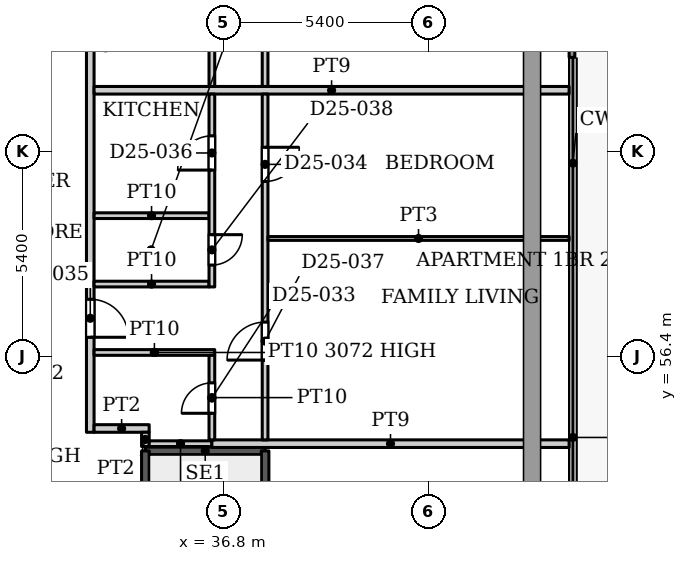
"""IFC4 building model, lengths in metres.
Left out: names, types, materials, properties, quantities, classifications, styles, units other than length and angle.
Written with IfcOpenShell. Run it as: python <this file> out.ifc"""

import sys

from ifc_helpers import new_model, si_unit, direction, frame, frame_2d, origin, place, context, subcontext, project, spatial, rectangle, extrude, source, transform, mapped, element, fill, save


model = new_model("IFC4")
c1 = context("Model", 3, precision=1e-05, world=origin(), true_north=direction((0.0, 1.0)))
c2 = subcontext(c1, "Body", "Model", "MODEL_VIEW")
j1 = project(units=[si_unit("LENGTHUNIT", "METRE"), si_unit("PLANEANGLEUNIT", "RADIAN")], contexts=[c1])
p1 = place(None, origin())
s1 = spatial("IfcSite", under=j1, at=p1, CompositionType="ELEMENT")
p2 = place(p1, origin())
s2 = spatial("IfcBuilding", under=s1, at=p2, CompositionType="ELEMENT")
p3 = place(p2, frame((0.0, 0.0, 109.7)))
s3 = spatial("IfcBuildingStorey", under=s2, at=p3, CompositionType="ELEMENT", Elevation=109.7)
p4 = place(p3, frame((45.975, 66.665, 0.0), z_axis=(0.0, 0.0, 1.0), x_axis=(0.0, -1.0, 0.0)))
e1 = element("IfcWall", 1, at=p4, inside=s3, PredefinedType="SOLIDWALL", context=c2, shape_type="SweptSolid", body=[
    extrude(rectangle(XDim=2.4, YDim=0.15, at=frame_2d((1.2, 0.0))), origin(), (0.0, 0.0, 1.0), 3.75),
])
p5 = place(p4, frame((0.3, 0.0, 0.0)))
e2 = element("IfcOpeningElement", 2, at=p5, cuts=e1, PredefinedType="OPENING", context=c2, shape_type="SweptSolid", body=[
    extrude(rectangle(XDim=1.8, YDim=2.4, at=frame_2d((0.9, 1.2))), frame((0.0, 0.085, 0.0), z_axis=(0.0, -1.0, 0.0), x_axis=(1.0, 0.0, 0.0)), (0.0, 0.0, 1.0), 0.17),
])
p6 = place(p3, frame((34.75, 53.91, 0.0), z_axis=(0.0, 0.0, 1.0), x_axis=(1.0, 0.0, 0.0)))
e3 = element("IfcWall", 3, at=p6, inside=s3, PredefinedType="SHEAR", context=c2, shape_type="SweptSolid", body=[
    extrude(rectangle(XDim=3.15, YDim=0.2, at=frame_2d((1.575, 0.0))), origin(), (0.0, 0.0, 1.0), 3.9),
])
p7 = place(p3, frame((34.75, 47.5, 0.0), z_axis=(0.0, 0.0, 1.0), x_axis=(0.0, 1.0, 0.0)))
e4 = element("IfcWall", 4, at=p7, inside=s3, PredefinedType="SHEAR", context=c2, shape_type="SweptSolid", body=[
    extrude(rectangle(XDim=6.41, YDim=0.2, at=frame_2d((3.205, 0.0))), origin(), (0.0, 0.0, 1.0), 3.9),
])
p8 = place(p3, frame((37.9, 44.75, 0.0), z_axis=(0.0, 0.0, 1.0), x_axis=(0.0, 1.0, 0.0)))
e5 = element("IfcWall", 5, at=p8, inside=s3, PredefinedType="SHEAR", context=c2, shape_type="SweptSolid", body=[
    extrude(rectangle(XDim=9.16, YDim=0.2, at=frame_2d((4.58, 0.0))), origin(), (0.0, 0.0, 1.0), 3.9),
])
p9 = place(p3, frame((33.3, 54.4, 0.0), z_axis=(0.0, 0.0, 1.0), x_axis=(0.0, 1.0, 0.0)))
e6 = element("IfcWall", 6, at=p9, inside=s3, PredefinedType="PARTITIONING", context=c2, shape_type="SweptSolid", body=[
    extrude(rectangle(XDim=24.8, YDim=0.2, at=frame_2d((12.4, 0.0))), origin(), (0.0, 0.0, 1.0), 3.6),
])
p10 = place(p9, frame((2.5, 0.0, 0.0)))
e7 = element("IfcOpeningElement", 7, at=p10, cuts=e6, PredefinedType="OPENING", context=c2, shape_type="SweptSolid", body=[
    extrude(rectangle(XDim=1.0, YDim=2.1, at=frame_2d((0.5, 1.05))), frame((0.0, 0.11, 0.0), z_axis=(0.0, -1.0, 0.0), x_axis=(1.0, 0.0, 0.0)), (0.0, 0.0, 1.0), 0.22),
])
p11 = place(p9, frame((22.6, 0.0, 0.0)))
e8 = element("IfcOpeningElement", 8, at=p11, cuts=e6, PredefinedType="OPENING", context=c2, shape_type="SweptSolid", body=[
    extrude(rectangle(XDim=1.0, YDim=2.1, at=frame_2d((0.5, 1.05))), frame((0.0, 0.11, 0.0), z_axis=(0.0, -1.0, 0.0), x_axis=(1.0, 0.0, 0.0)), (0.0, 0.0, 1.0), 0.22),
])
p12 = place(p3, frame((33.4, 54.5, 0.0), z_axis=(0.0, 0.0, 1.0), x_axis=(1.0, 0.0, 0.0)))
e9 = element("IfcWall", 9, at=p12, inside=s3, PredefinedType="PARTITIONING", context=c2, shape_type="SweptSolid", body=[
    extrude(rectangle(XDim=1.45, YDim=0.2, at=frame_2d((0.725, 0.0))), origin(), (0.0, 0.0, 1.0), 3.6),
])
p13 = place(p3, frame((33.4, 56.5, 0.0), z_axis=(0.0, 0.0, 1.0), x_axis=(1.0, 0.0, 0.0)))
e10 = element("IfcWall", 10, at=p13, inside=s3, PredefinedType="PARTITIONING", context=c2, shape_type="SweptSolid", body=[
    extrude(rectangle(XDim=3.175, YDim=0.15, at=frame_2d((1.587, 0.0))), origin(), (0.0, 0.0, 1.0), 3.072),
])
for number, where, z_axis, x_axis in (
    (11, (33.4, 58.3, 0.0), (0.0, 0.0, 1.0), (1.0, 0.0, 0.0)),
    (12, (33.4, 60.1, 0.0), (0.0, 0.0, 1.0), (1.0, 0.0, 0.0)),
):
    element("IfcWall", number, at=place(p3, frame(where, z_axis=z_axis, x_axis=x_axis)), inside=s3, PredefinedType="PARTITIONING", context=c2, shape_type="SweptSolid", body=[
        extrude(rectangle(XDim=3.025, YDim=0.15, at=frame_2d((1.513, 0.0))), origin(), (0.0, 0.0, 1.0), 3.6),
    ])
p14 = place(p3, frame((33.4, 63.4, 0.0), z_axis=(0.0, 0.0, 1.0), x_axis=(1.0, 0.0, 0.0)))
e13 = element("IfcWall", 13, at=p14, inside=s3, PredefinedType="PARTITIONING", context=c2, shape_type="SweptSolid", body=[
    extrude(rectangle(XDim=12.5, YDim=0.2, at=frame_2d((6.25, 0.0))), origin(), (0.0, 0.0, 1.0), 3.6),
])
p15 = place(p3, frame((34.75, 54.025, 0.0), z_axis=(0.0, 0.0, 1.0), x_axis=(0.0, 1.0, 0.0)))
e14 = element("IfcWall", 14, at=p15, inside=s3, PredefinedType="PARTITIONING", context=c2, shape_type="SweptSolid", body=[
    extrude(rectangle(XDim=0.375, YDim=0.2, at=frame_2d((0.188, 0.0))), origin(), (0.0, 0.0, 1.0), 3.6),
])
p16 = place(p3, frame((34.85, 54.1, 0.0), z_axis=(0.0, 0.0, 1.0), x_axis=(1.0, 0.0, 0.0)))
e15 = element("IfcWall", 15, at=p16, inside=s3, PredefinedType="PARTITIONING", context=c2, shape_type="SweptSolid", body=[
    extrude(rectangle(XDim=1.65, YDim=0.15, at=frame_2d((0.825, 0.0))), origin(), (0.0, 0.0, 1.0), 3.6),
])
p17 = place(p3, frame((36.5, 54.1, 0.0), z_axis=(0.0, 0.0, 1.0), x_axis=(1.0, 0.0, 0.0)))
e16 = element("IfcWall", 16, at=p17, inside=s3, PredefinedType="PARTITIONING", context=c2, shape_type="SweptSolid", body=[
    extrude(rectangle(XDim=9.4, YDim=0.2, at=frame_2d((4.7, 0.0))), origin(), (0.0, 0.0, 1.0), 3.6),
])
p18 = place(p3, frame((36.5, 54.2, 0.0), z_axis=(0.0, 0.0, 1.0), x_axis=(0.0, 1.0, 0.0)))
e17 = element("IfcWall", 17, at=p18, inside=s3, PredefinedType="PARTITIONING", context=c2, shape_type="SweptSolid", body=[
    extrude(rectangle(XDim=2.225, YDim=0.15, at=frame_2d((1.113, 0.0))), origin(), (0.0, 0.0, 1.0), 3.6),
])
p19 = place(p18, frame((0.7, 0.0, 0.0)))
e18 = element("IfcOpeningElement", 18, at=p19, cuts=e17, PredefinedType="OPENING", context=c2, shape_type="SweptSolid", body=[
    extrude(rectangle(XDim=0.8, YDim=2.1, at=frame_2d((0.4, 1.05))), frame((0.0, 0.085, 0.0), z_axis=(0.0, -1.0, 0.0), x_axis=(1.0, 0.0, 0.0)), (0.0, 0.0, 1.0), 0.17),
])
p20 = place(p3, frame((36.5, 58.225, 0.0), z_axis=(0.0, 0.0, 1.0), x_axis=(0.0, 1.0, 0.0)))
e19 = element("IfcWall", 19, at=p20, inside=s3, PredefinedType="PARTITIONING", context=c2, shape_type="SweptSolid", body=[
    extrude(rectangle(XDim=5.075, YDim=0.15, at=frame_2d((2.538, 0.0))), origin(), (0.0, 0.0, 1.0), 3.6),
])
p21 = place(p20, frame((3.075, 0.0, 0.0)))
e20 = element("IfcOpeningElement", 20, at=p21, cuts=e19, PredefinedType="OPENING", context=c2, shape_type="SweptSolid", body=[
    extrude(rectangle(XDim=0.9, YDim=2.1, at=frame_2d((0.45, 1.05))), frame((0.0, 0.085, 0.0), z_axis=(0.0, -1.0, 0.0), x_axis=(1.0, 0.0, 0.0)), (0.0, 0.0, 1.0), 0.17),
])
p22 = place(p20, frame((0.575, 0.0, 0.0)))
e21 = element("IfcOpeningElement", 21, at=p22, cuts=e19, PredefinedType="OPENING", context=c2, shape_type="SweptSolid", body=[
    extrude(rectangle(XDim=0.8, YDim=2.1, at=frame_2d((0.4, 1.05))), frame((0.0, 0.085, 0.0), z_axis=(0.0, -1.0, 0.0), x_axis=(1.0, 0.0, 0.0)), (0.0, 0.0, 1.0), 0.17),
])
p23 = place(p3, frame((36.5, 63.5, 0.0), z_axis=(0.0, 0.0, 1.0), x_axis=(0.0, 1.0, 0.0)))
e22 = element("IfcWall", 22, at=p23, inside=s3, PredefinedType="PARTITIONING", context=c2, shape_type="SweptSolid", body=[
    extrude(rectangle(XDim=12.875, YDim=0.15, at=frame_2d((6.438, 0.0))), origin(), (0.0, 0.0, 1.0), 3.6),
])
p24 = place(p23, frame((7.9, 0.0, 0.0)))
e23 = element("IfcOpeningElement", 23, at=p24, cuts=e22, PredefinedType="OPENING", context=c2, shape_type="SweptSolid", body=[
    extrude(rectangle(XDim=0.8, YDim=2.1, at=frame_2d((0.4, 1.05))), frame((0.0, 0.085, 0.0), z_axis=(0.0, -1.0, 0.0), x_axis=(1.0, 0.0, 0.0)), (0.0, 0.0, 1.0), 0.17),
])
p25 = place(p23, frame((10.9, 0.0, 0.0)))
e24 = element("IfcOpeningElement", 24, at=p25, cuts=e22, PredefinedType="OPENING", context=c2, shape_type="SweptSolid", body=[
    extrude(rectangle(XDim=0.8, YDim=2.1, at=frame_2d((0.4, 1.05))), frame((0.0, 0.085, 0.0), z_axis=(0.0, -1.0, 0.0), x_axis=(1.0, 0.0, 0.0)), (0.0, 0.0, 1.0), 0.17),
])
p26 = place(p23, frame((1.45, 0.0, 0.0)))
e25 = element("IfcOpeningElement", 25, at=p26, cuts=e22, PredefinedType="OPENING", context=c2, shape_type="SweptSolid", body=[
    extrude(rectangle(XDim=0.9, YDim=2.1, at=frame_2d((0.45, 1.05))), frame((0.0, 0.085, 0.0), z_axis=(0.0, -1.0, 0.0), x_axis=(1.0, 0.0, 0.0)), (0.0, 0.0, 1.0), 0.17),
])
p27 = place(p23, frame((5.2, 0.0, 0.0)))
e26 = element("IfcOpeningElement", 26, at=p27, cuts=e22, PredefinedType="OPENING", context=c2, shape_type="SweptSolid", body=[
    extrude(rectangle(XDim=0.8, YDim=2.1, at=frame_2d((0.4, 1.05))), frame((0.0, 0.085, 0.0), z_axis=(0.0, -1.0, 0.0), x_axis=(1.0, 0.0, 0.0)), (0.0, 0.0, 1.0), 0.17),
])
p28 = place(p3, frame((37.9, 54.2, 0.0), z_axis=(0.0, 0.0, 1.0), x_axis=(0.0, 1.0, 0.0)))
e27 = element("IfcWall", 27, at=p28, inside=s3, PredefinedType="PARTITIONING", context=c2, shape_type="SweptSolid", body=[
    extrude(rectangle(XDim=9.1, YDim=0.15, at=frame_2d((4.55, 0.0))), origin(), (0.0, 0.0, 1.0), 3.6),
])
p29 = place(p28, frame((6.8, 0.0, 0.0)))
e28 = element("IfcOpeningElement", 28, at=p29, cuts=e27, PredefinedType="OPENING", context=c2, shape_type="SweptSolid", body=[
    extrude(rectangle(XDim=0.9, YDim=2.1, at=frame_2d((0.45, 1.05))), frame((0.0, 0.085, 0.0), z_axis=(0.0, -1.0, 0.0), x_axis=(1.0, 0.0, 0.0)), (0.0, 0.0, 1.0), 0.17),
])
p30 = place(p28, frame((2.1, 0.0, 0.0)))
e29 = element("IfcOpeningElement", 29, at=p30, cuts=e27, PredefinedType="OPENING", context=c2, shape_type="SweptSolid", body=[
    extrude(rectangle(XDim=1.0, YDim=2.1, at=frame_2d((0.5, 1.05))), frame((0.0, 0.085, 0.0), z_axis=(0.0, -1.0, 0.0), x_axis=(1.0, 0.0, 0.0)), (0.0, 0.0, 1.0), 0.17),
])
p31 = place(p3, frame((37.9, 63.5, 0.0), z_axis=(0.0, 0.0, 1.0), x_axis=(0.0, 1.0, 0.0)))
e30 = element("IfcWall", 30, at=p31, inside=s3, PredefinedType="PARTITIONING", context=c2, shape_type="SweptSolid", body=[
    extrude(rectangle(XDim=15.7, YDim=0.15, at=frame_2d((7.85, 0.0))), origin(), (0.0, 0.0, 1.0), 3.6),
])
p32 = place(p31, frame((1.1, 0.0, 0.0)))
e31 = element("IfcOpeningElement", 31, at=p32, cuts=e30, PredefinedType="OPENING", context=c2, shape_type="SweptSolid", body=[
    extrude(rectangle(XDim=0.9, YDim=2.1, at=frame_2d((0.45, 1.05))), frame((0.0, 0.085, 0.0), z_axis=(0.0, -1.0, 0.0), x_axis=(1.0, 0.0, 0.0)), (0.0, 0.0, 1.0), 0.17),
])
p33 = place(p31, frame((10.85, 0.0, 0.0)))
e32 = element("IfcOpeningElement", 32, at=p33, cuts=e30, PredefinedType="OPENING", context=c2, shape_type="SweptSolid", body=[
    extrude(rectangle(XDim=0.9, YDim=2.1, at=frame_2d((0.45, 1.05))), frame((0.0, 0.085, 0.0), z_axis=(0.0, -1.0, 0.0), x_axis=(1.0, 0.0, 0.0)), (0.0, 0.0, 1.0), 0.17),
])
p34 = place(p31, frame((13.8, 0.0, 0.0)))
e33 = element("IfcOpeningElement", 33, at=p34, cuts=e30, PredefinedType="OPENING", context=c2, shape_type="SweptSolid", body=[
    extrude(rectangle(XDim=1.0, YDim=2.1, at=frame_2d((0.5, 1.05))), frame((0.0, 0.085, 0.0), z_axis=(0.0, -1.0, 0.0), x_axis=(1.0, 0.0, 0.0)), (0.0, 0.0, 1.0), 0.17),
])
p35 = place(p31, frame((4.1, 0.0, 0.0)))
e34 = element("IfcOpeningElement", 34, at=p35, cuts=e30, PredefinedType="OPENING", context=c2, shape_type="SweptSolid", body=[
    extrude(rectangle(XDim=0.9, YDim=2.1, at=frame_2d((0.45, 1.05))), frame((0.0, 0.085, 0.0), z_axis=(0.0, -1.0, 0.0), x_axis=(1.0, 0.0, 0.0)), (0.0, 0.0, 1.0), 0.17),
])
p36 = place(p31, frame((8.45, 0.0, 0.0)))
e35 = element("IfcOpeningElement", 35, at=p36, cuts=e30, PredefinedType="OPENING", context=c2, shape_type="SweptSolid", body=[
    extrude(rectangle(XDim=0.9, YDim=2.1, at=frame_2d((0.45, 1.05))), frame((0.0, 0.085, 0.0), z_axis=(0.0, -1.0, 0.0), x_axis=(1.0, 0.0, 0.0)), (0.0, 0.0, 1.0), 0.17),
])
p37 = place(p3, frame((37.975, 59.5, 0.0), z_axis=(0.0, 0.0, 1.0), x_axis=(1.0, 0.0, 0.0)))
e36 = element("IfcWall", 36, at=p37, inside=s3, PredefinedType="PARTITIONING", context=c2, shape_type="SweptSolid", body=[
    extrude(rectangle(XDim=7.925, YDim=0.1, at=frame_2d((3.962, 0.0))), origin(), (0.0, 0.0, 1.0), 3.6),
])
m1 = source(origin(), c2, "Body", "SweptSolid", [
    extrude(rectangle(XDim=0.8, YDim=2.1, at=frame_2d((0.4, 1.05))), frame((0.0, 0.025, 0.0), z_axis=(0.0, -1.0, 0.0), x_axis=(1.0, 0.0, 0.0)), (0.0, 0.0, 1.0), 0.05),
])
p38 = place(p19, origin())
e37 = element("IfcDoor", 37, at=p38, inside=s3, OperationType="SINGLE_SWING_LEFT", PredefinedType="DOOR", context=c2, shape_type="MappedRepresentation", body=[
    mapped(m1, transform((0.0, 0.0, 0.0), x_axis=(1.0, 0.0, 0.0), y_axis=(0.0, 1.0, 0.0), z_axis=(0.0, 0.0, 1.0), scale=1.0)),
])
fill(e18, e37)
m2 = source(origin(), c2, "Body", "SweptSolid", [
    extrude(rectangle(XDim=0.9, YDim=2.1, at=frame_2d((0.45, 1.05))), frame((0.0, 0.025, 0.0), z_axis=(0.0, -1.0, 0.0), x_axis=(1.0, 0.0, 0.0)), (0.0, 0.0, 1.0), 0.05),
])
p39 = place(p29, origin())
e38 = element("IfcDoor", 38, at=p39, inside=s3, OperationType="SINGLE_SWING_RIGHT", PredefinedType="DOOR", context=c2, shape_type="MappedRepresentation", body=[
    mapped(m2, transform((0.0, 0.0, 0.0), x_axis=(1.0, 0.0, 0.0), y_axis=(0.0, 1.0, 0.0), z_axis=(0.0, 0.0, 1.0), scale=1.0)),
])
fill(e28, e38)
m3 = source(origin(), c2, "Body", "SweptSolid", [
    extrude(rectangle(XDim=1.0, YDim=2.1, at=frame_2d((0.5, 1.05))), frame((0.0, 0.025, 0.0), z_axis=(0.0, -1.0, 0.0), x_axis=(1.0, 0.0, 0.0)), (0.0, 0.0, 1.0), 0.05),
])
p40 = place(p10, origin())
e39 = element("IfcDoor", 39, at=p40, inside=s3, OperationType="SINGLE_SWING_RIGHT", PredefinedType="DOOR", context=c2, shape_type="MappedRepresentation", body=[
    mapped(m3, transform((0.0, 0.0, 0.0), x_axis=(1.0, 0.0, 0.0), y_axis=(0.0, 1.0, 0.0), z_axis=(0.0, 0.0, 1.0), scale=1.0)),
])
fill(e7, e39)
p41 = place(p21, origin())
e40 = element("IfcDoor", 40, at=p41, inside=s3, OperationType="SINGLE_SWING_LEFT", PredefinedType="DOOR", context=c2, shape_type="MappedRepresentation", body=[
    mapped(m2, transform((0.0, 0.0, 0.0), x_axis=(1.0, 0.0, 0.0), y_axis=(0.0, 1.0, 0.0), z_axis=(0.0, 0.0, 1.0), scale=1.0)),
])
fill(e20, e40)
m4 = source(origin(), c2, "Body", "SweptSolid", [
    extrude(rectangle(XDim=1.0, YDim=2.1, at=frame_2d((0.5, 1.05))), frame((0.0, 0.025, 0.0), z_axis=(0.0, -1.0, 0.0), x_axis=(1.0, 0.0, 0.0)), (0.0, 0.0, 1.0), 0.05),
])
p42 = place(p30, origin())
e41 = element("IfcDoor", 41, at=p42, inside=s3, OperationType="SINGLE_SWING_LEFT", PredefinedType="DOOR", context=c2, shape_type="MappedRepresentation", body=[
    mapped(m4, transform((0.0, 0.0, 0.0), x_axis=(1.0, 0.0, 0.0), y_axis=(0.0, 1.0, 0.0), z_axis=(0.0, 0.0, 1.0), scale=1.0)),
])
fill(e29, e41)
p43 = place(p22, origin())
e42 = element("IfcDoor", 42, at=p43, inside=s3, OperationType="SINGLE_SWING_RIGHT", PredefinedType="DOOR", context=c2, shape_type="MappedRepresentation", body=[
    mapped(m1, transform((0.0, 0.0, 0.0), x_axis=(1.0, 0.0, 0.0), y_axis=(0.0, 1.0, 0.0), z_axis=(0.0, 0.0, 1.0), scale=1.0)),
])
fill(e21, e42)
save(model, sys.argv[1])
